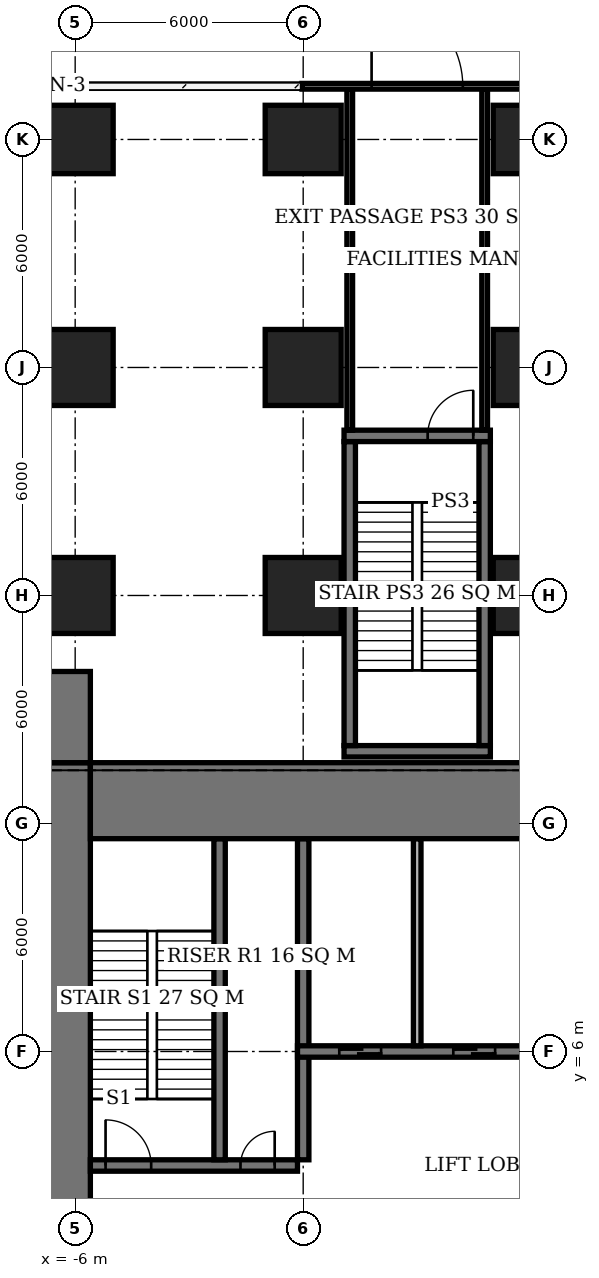
"""IFC4 building model, lengths in metres.
Left out: names, types, materials, properties, quantities, classifications, styles, units other than length and angle.
Written with IfcOpenShell. Run it as: python <this file> out.ifc"""

import sys

from ifc_helpers import new_model, si_unit, direction, frame, frame_2d, origin, origin_2d, place, context, subcontext, project, spatial, rectangle, extrude, element, fill, save


model = new_model("IFC4")
c1 = context("Model", 3, precision=1e-05, world=origin(), true_north=direction((0.0, 1.0)))
c2 = subcontext(c1, "Body", "Model", "MODEL_VIEW")
j1 = project(units=[si_unit("LENGTHUNIT", "METRE"), si_unit("PLANEANGLEUNIT", "RADIAN")], contexts=[c1])
p1 = place(None, origin())
s1 = spatial("IfcSite", under=j1, at=p1, CompositionType="ELEMENT")
p2 = place(p1, origin())
s2 = spatial("IfcBuilding", under=s1, at=p2, CompositionType="ELEMENT")
p3 = place(p2, origin())
s3 = spatial("IfcBuildingStorey", under=s2, at=p3, CompositionType="ELEMENT", Elevation=0.0)
p4 = place(p3, frame((-6.0, 18.0, 0.0), z_axis=(0.0, 0.0, 1.0), x_axis=(1.0, 0.0, 0.0)))
e1 = element("IfcColumn", 1, at=p4, inside=s3, PredefinedType="COLUMN", context=c2, shape_type="SweptSolid", body=[
    extrude(rectangle(XDim=2.0, YDim=2.0, at=origin_2d()), origin(), (0.0, 0.0, 1.0), 6.0),
])
p5 = place(p3, frame((-6.0, 24.0, -0.45), z_axis=(0.0, 0.0, 1.0), x_axis=(1.0, 0.0, 0.0)))
e2 = element("IfcColumn", 2, at=p5, inside=s3, PredefinedType="COLUMN", context=c2, shape_type="SweptSolid", body=[
    extrude(rectangle(XDim=2.0, YDim=2.0, at=origin_2d()), origin(), (0.0, 0.0, 1.0), 6.45),
])
p6 = place(p3, frame((-6.0, 30.0, -0.45), z_axis=(0.0, 0.0, 1.0), x_axis=(1.0, 0.0, 0.0)))
e3 = element("IfcColumn", 3, at=p6, inside=s3, PredefinedType="COLUMN", context=c2, shape_type="SweptSolid", body=[
    extrude(rectangle(XDim=2.0, YDim=1.8, at=origin_2d()), origin(), (0.0, 0.0, 1.0), 6.45),
])
p7 = place(p3, frame((0.0, 18.0, 0.0), z_axis=(0.0, 0.0, 1.0), x_axis=(1.0, 0.0, 0.0)))
e4 = element("IfcColumn", 4, at=p7, inside=s3, PredefinedType="COLUMN", context=c2, shape_type="SweptSolid", body=[
    extrude(rectangle(XDim=2.0, YDim=2.0, at=origin_2d()), origin(), (0.0, 0.0, 1.0), 6.0),
])
p8 = place(p3, frame((0.0, 24.0, -0.45), z_axis=(0.0, 0.0, 1.0), x_axis=(1.0, 0.0, 0.0)))
e5 = element("IfcColumn", 5, at=p8, inside=s3, PredefinedType="COLUMN", context=c2, shape_type="SweptSolid", body=[
    extrude(rectangle(XDim=2.0, YDim=2.0, at=origin_2d()), origin(), (0.0, 0.0, 1.0), 6.45),
])
p9 = place(p3, frame((0.0, 30.0, -0.45), z_axis=(0.0, 0.0, 1.0), x_axis=(1.0, 0.0, 0.0)))
e6 = element("IfcColumn", 6, at=p9, inside=s3, PredefinedType="COLUMN", context=c2, shape_type="SweptSolid", body=[
    extrude(rectangle(XDim=2.0, YDim=1.8, at=origin_2d()), origin(), (0.0, 0.0, 1.0), 6.45),
])
p10 = place(p3, frame((6.0, 18.0, 0.0), z_axis=(0.0, 0.0, 1.0), x_axis=(1.0, 0.0, 0.0)))
e7 = element("IfcColumn", 7, at=p10, inside=s3, PredefinedType="COLUMN", context=c2, shape_type="SweptSolid", body=[
    extrude(rectangle(XDim=2.0, YDim=2.0, at=origin_2d()), origin(), (0.0, 0.0, 1.0), 6.0),
])
p11 = place(p3, frame((6.0, 24.0, -0.45), z_axis=(0.0, 0.0, 1.0), x_axis=(1.0, 0.0, 0.0)))
e8 = element("IfcColumn", 8, at=p11, inside=s3, PredefinedType="COLUMN", context=c2, shape_type="SweptSolid", body=[
    extrude(rectangle(XDim=2.0, YDim=2.0, at=origin_2d()), origin(), (0.0, 0.0, 1.0), 6.45),
])
p12 = place(p3, frame((6.0, 30.0, -0.45), z_axis=(0.0, 0.0, 1.0), x_axis=(1.0, 0.0, 0.0)))
e9 = element("IfcColumn", 9, at=p12, inside=s3, PredefinedType="COLUMN", context=c2, shape_type="SweptSolid", body=[
    extrude(rectangle(XDim=2.0, YDim=1.8, at=origin_2d()), origin(), (0.0, 0.0, 1.0), 6.45),
])
p13 = place(p3, frame((-5.6, 12.6, 0.0), z_axis=(0.0, 0.0, 1.0), x_axis=(1.0, 0.0, 0.0)))
e10 = element("IfcWall", 10, at=p13, inside=s3, PredefinedType="SHEAR", context=c2, shape_type="SweptSolid", body=[
    extrude(rectangle(XDim=23.2, YDim=2.0, at=frame_2d((11.6, 0.0))), origin(), (0.0, 0.0, 1.0), 6.0),
])
p14 = place(p3, frame((-6.5, -7.6, 0.0), z_axis=(0.0, 0.0, 1.0), x_axis=(0.0, 1.0, 0.0)))
e11 = element("IfcWall", 11, at=p14, inside=s3, PredefinedType="SHEAR", context=c2, shape_type="SweptSolid", body=[
    extrude(rectangle(XDim=21.2, YDim=1.8, at=frame_2d((10.6, 0.0))), origin(), (0.0, 0.0, 1.0), 6.0),
])
p15 = place(p14, frame((7.8, 0.0, 0.0)))
e12 = element("IfcOpeningElement", 12, at=p15, cuts=e11, PredefinedType="OPENING", context=c2, shape_type="SweptSolid", body=[
    extrude(rectangle(XDim=1.8, YDim=2.4, at=frame_2d((0.9, 1.2))), frame((0.0, 0.91, 0.0), z_axis=(0.0, -1.0, 0.0), x_axis=(1.0, 0.0, 0.0)), (0.0, 0.0, 1.0), 1.82),
])
p16 = place(p3, frame((-6.5, 13.6, 0.0), z_axis=(0.0, 0.0, 1.0), x_axis=(0.0, 1.0, 0.0)))
e13 = element("IfcWall", 13, at=p16, inside=s3, PredefinedType="SHEAR", context=c2, shape_type="SweptSolid", body=[
    extrude(rectangle(XDim=2.4, YDim=1.8, at=frame_2d((1.2, 0.0))), origin(), (0.0, 0.0, 1.0), 6.0),
])
p17 = place(p3, frame((-5.6, 3.0, 0.0), z_axis=(0.0, 0.0, 1.0), x_axis=(1.0, 0.0, 0.0)))
e14 = element("IfcWall", 14, at=p17, inside=s3, PredefinedType="SHEAR", context=c2, shape_type="SweptSolid", body=[
    extrude(rectangle(XDim=5.45, YDim=0.3, at=frame_2d((2.725, 0.0))), origin(), (0.0, 0.0, 1.0), 6.0),
])
p18 = place(p17, frame((0.4, 0.0, 0.0)))
e15 = element("IfcOpeningElement", 15, at=p18, cuts=e14, PredefinedType="OPENING", context=c2, shape_type="SweptSolid", body=[
    extrude(rectangle(XDim=1.2, YDim=2.1, at=frame_2d((0.6, 1.05))), frame((0.0, 0.16, 0.0), z_axis=(0.0, -1.0, 0.0), x_axis=(1.0, 0.0, 0.0)), (0.0, 0.0, 1.0), 0.32),
])
p19 = place(p17, frame((3.95, 0.0, 0.0)))
e16 = element("IfcOpeningElement", 16, at=p19, cuts=e14, PredefinedType="OPENING", context=c2, shape_type="SweptSolid", body=[
    extrude(rectangle(XDim=0.9, YDim=2.1, at=frame_2d((0.45, 1.05))), frame((0.0, 0.16, 0.0), z_axis=(0.0, -1.0, 0.0), x_axis=(1.0, 0.0, 0.0)), (0.0, 0.0, 1.0), 0.32),
])
p20 = place(p3, frame((-0.15, 6.0, 0.0), z_axis=(0.0, 0.0, 1.0), x_axis=(1.0, 0.0, 0.0)))
e17 = element("IfcWall", 17, at=p20, inside=s3, PredefinedType="SHEAR", context=c2, shape_type="SweptSolid", body=[
    extrude(rectangle(XDim=17.75, YDim=0.3, at=frame_2d((8.875, 0.0))), origin(), (0.0, 0.0, 1.0), 6.0),
])
p21 = place(p20, frame((13.15, 0.0, 0.0)))
e18 = element("IfcOpeningElement", 18, at=p21, cuts=e17, PredefinedType="OPENING", context=c2, shape_type="SweptSolid", body=[
    extrude(rectangle(XDim=0.9, YDim=2.1, at=frame_2d((0.45, 1.05))), frame((0.0, 0.16, 0.0), z_axis=(0.0, -1.0, 0.0), x_axis=(1.0, 0.0, 0.0)), (0.0, 0.0, 1.0), 0.32),
])
p22 = place(p20, frame((16.25, 0.0, 0.0)))
e19 = element("IfcOpeningElement", 19, at=p22, cuts=e17, PredefinedType="OPENING", context=c2, shape_type="SweptSolid", body=[
    extrude(rectangle(XDim=1.0, YDim=2.1, at=frame_2d((0.5, 1.05))), frame((0.0, 0.16, 0.0), z_axis=(0.0, -1.0, 0.0), x_axis=(1.0, 0.0, 0.0)), (0.0, 0.0, 1.0), 0.32),
])
p23 = place(p20, frame((1.1, 0.0, 0.0)))
e20 = element("IfcOpeningElement", 20, at=p23, cuts=e17, PredefinedType="OPENING", context=c2, shape_type="SweptSolid", body=[
    extrude(rectangle(XDim=1.1, YDim=2.1, at=frame_2d((0.55, 1.05))), frame((0.0, 0.16, 0.0), z_axis=(0.0, -1.0, 0.0), x_axis=(1.0, 0.0, 0.0)), (0.0, 0.0, 1.0), 0.32),
])
p24 = place(p20, frame((4.1, 0.0, 0.0)))
e21 = element("IfcOpeningElement", 21, at=p24, cuts=e17, PredefinedType="OPENING", context=c2, shape_type="SweptSolid", body=[
    extrude(rectangle(XDim=1.1, YDim=2.1, at=frame_2d((0.55, 1.05))), frame((0.0, 0.16, 0.0), z_axis=(0.0, -1.0, 0.0), x_axis=(1.0, 0.0, 0.0)), (0.0, 0.0, 1.0), 0.32),
])
p25 = place(p20, frame((7.1, 0.0, 0.0)))
e22 = element("IfcOpeningElement", 22, at=p25, cuts=e17, PredefinedType="OPENING", context=c2, shape_type="SweptSolid", body=[
    extrude(rectangle(XDim=1.1, YDim=2.1, at=frame_2d((0.55, 1.05))), frame((0.0, 0.16, 0.0), z_axis=(0.0, -1.0, 0.0), x_axis=(1.0, 0.0, 0.0)), (0.0, 0.0, 1.0), 0.32),
])
p26 = place(p20, frame((10.1, 0.0, 0.0)))
e23 = element("IfcOpeningElement", 23, at=p26, cuts=e17, PredefinedType="OPENING", context=c2, shape_type="SweptSolid", body=[
    extrude(rectangle(XDim=1.1, YDim=2.1, at=frame_2d((0.55, 1.05))), frame((0.0, 0.16, 0.0), z_axis=(0.0, -1.0, 0.0), x_axis=(1.0, 0.0, 0.0)), (0.0, 0.0, 1.0), 0.32),
])
for number, where, z_axis, x_axis in (
    (24, (0.0, 3.15, 0.0), (0.0, 0.0, 1.0), (0.0, 1.0, 0.0)),
    (25, (-2.2, 3.15, 0.0), (0.0, 0.0, 1.0), (0.0, 1.0, 0.0)),
):
    element("IfcWall", number, at=place(p3, frame(where, z_axis=z_axis, x_axis=x_axis)), inside=s3, PredefinedType="SHEAR", context=c2, shape_type="SweptSolid", body=[
        extrude(rectangle(XDim=8.45, YDim=0.3, at=frame_2d((4.225, 0.0))), origin(), (0.0, 0.0, 1.0), 6.0),
    ])
p27 = place(p3, frame((3.0, 6.15, 0.0), z_axis=(0.0, 0.0, 1.0), x_axis=(0.0, 1.0, 0.0)))
e26 = element("IfcWall", 26, at=p27, inside=s3, PredefinedType="SOLIDWALL", context=c2, shape_type="SweptSolid", body=[
    extrude(rectangle(XDim=5.45, YDim=0.2, at=frame_2d((2.725, 0.0))), origin(), (0.0, 0.0, 1.0), 6.0),
])
p28 = place(p3, frame((-0.032, 31.4, 0.0), z_axis=(0.0, 0.0, 1.0), x_axis=(1.0, 0.0, 0.0)))
e27 = element("IfcWall", 27, at=p28, inside=s3, PredefinedType="USERDEFINED", context=c2, shape_type="SweptSolid", body=[
    extrude(rectangle(XDim=6.064, YDim=0.15, at=frame_2d((3.032, 0.0))), origin(), (0.0, 0.0, 1.0), 6.0),
])
p29 = place(p28, frame((1.832, 0.0, 0.0)))
e28 = element("IfcOpeningElement", 28, at=p29, cuts=e27, PredefinedType="OPENING", context=c2, shape_type="SweptSolid", body=[
    extrude(rectangle(XDim=2.4, YDim=2.7, at=frame_2d((1.2, 1.35))), frame((0.0, 0.085, 0.0), z_axis=(0.0, -1.0, 0.0), x_axis=(1.0, 0.0, 0.0)), (0.0, 0.0, 1.0), 0.17),
])
p30 = place(p3, frame((1.075, 13.9, 0.0), z_axis=(0.0, 0.0, 1.0), x_axis=(1.0, 0.0, 0.0)))
e29 = element("IfcWall", 29, at=p30, inside=s3, PredefinedType="SOLIDWALL", context=c2, shape_type="SweptSolid", body=[
    extrude(rectangle(XDim=3.85, YDim=0.3, at=frame_2d((1.925, 0.0))), origin(), (0.0, 0.0, 1.0), 5.75),
])
p31 = place(p3, frame((1.075, 22.2, 0.0), z_axis=(0.0, 0.0, 1.0), x_axis=(1.0, 0.0, 0.0)))
e30 = element("IfcWall", 30, at=p31, inside=s3, PredefinedType="SOLIDWALL", context=c2, shape_type="SweptSolid", body=[
    extrude(rectangle(XDim=3.85, YDim=0.3, at=frame_2d((1.925, 0.0))), origin(), (0.0, 0.0, 1.0), 5.75),
])
p32 = place(p31, frame((2.2, 0.0, 0.0)))
e31 = element("IfcOpeningElement", 31, at=p32, cuts=e30, PredefinedType="OPENING", context=c2, shape_type="SweptSolid", body=[
    extrude(rectangle(XDim=1.2, YDim=2.1, at=frame_2d((0.6, 1.05))), frame((0.0, 0.16, 0.0), z_axis=(0.0, -1.0, 0.0), x_axis=(1.0, 0.0, 0.0)), (0.0, 0.0, 1.0), 0.32),
])
for number, where, z_axis, x_axis in (
    (32, (1.225, 14.05, 0.0), (0.0, 0.0, 1.0), (0.0, 1.0, 0.0)),
    (33, (4.775, 14.05, 0.0), (0.0, 0.0, 1.0), (0.0, 1.0, 0.0)),
):
    element("IfcWall", number, at=place(p3, frame(where, z_axis=z_axis, x_axis=x_axis)), inside=s3, PredefinedType="SOLIDWALL", context=c2, shape_type="SweptSolid", body=[
        extrude(rectangle(XDim=8.0, YDim=0.3, at=frame_2d((4.0, 0.0))), origin(), (0.0, 0.0, 1.0), 5.75),
    ])
for number, where, z_axis, x_axis in (
    (34, (1.225, 22.35, 0.0), (0.0, 0.0, 1.0), (0.0, 1.0, 0.0)),
    (35, (4.775, 22.35, 0.0), (0.0, 0.0, 1.0), (0.0, 1.0, 0.0)),
):
    element("IfcWall", number, at=place(p3, frame(where, z_axis=z_axis, x_axis=x_axis)), inside=s3, PredefinedType="PARTITIONING", context=c2, shape_type="SweptSolid", body=[
        extrude(rectangle(XDim=8.975, YDim=0.15, at=frame_2d((4.487, 0.0))), origin(), (0.0, 0.0, 1.0), 5.75),
    ])
p33 = place(p18, origin())
e36 = element("IfcDoor", 36, at=p33, inside=s3, OperationType="SINGLE_SWING_LEFT", PredefinedType="DOOR", context=c2, shape_type="SweptSolid", body=[
    extrude(rectangle(XDim=1.2, YDim=2.1, at=frame_2d((0.6, 1.05))), frame((0.0, 0.025, 0.0), z_axis=(0.0, -1.0, 0.0), x_axis=(1.0, 0.0, 0.0)), (0.0, 0.0, 1.0), 0.05),
])
fill(e15, e36)
p34 = place(p19, origin())
e37 = element("IfcDoor", 37, at=p34, inside=s3, OperationType="SINGLE_SWING_RIGHT", PredefinedType="DOOR", context=c2, shape_type="SweptSolid", body=[
    extrude(rectangle(XDim=0.9, YDim=2.1, at=frame_2d((0.45, 1.05))), frame((0.0, 0.025, 0.0), z_axis=(0.0, -1.0, 0.0), x_axis=(1.0, 0.0, 0.0)), (0.0, 0.0, 1.0), 0.05),
])
fill(e16, e37)
p35 = place(p23, origin())
e38 = element("IfcDoor", 38, at=p35, inside=s3, OperationType="DOUBLE_DOOR_SLIDING", PredefinedType="USERDEFINED", context=c2, shape_type="SweptSolid", body=[
    extrude(rectangle(XDim=1.1, YDim=2.1, at=frame_2d((0.55, 1.05))), frame((0.0, 0.025, 0.0), z_axis=(0.0, -1.0, 0.0), x_axis=(1.0, 0.0, 0.0)), (0.0, 0.0, 1.0), 0.05),
])
fill(e20, e38)
p36 = place(p24, origin())
e39 = element("IfcDoor", 39, at=p36, inside=s3, OperationType="DOUBLE_DOOR_SLIDING", PredefinedType="USERDEFINED", context=c2, shape_type="SweptSolid", body=[
    extrude(rectangle(XDim=1.1, YDim=2.1, at=frame_2d((0.55, 1.05))), frame((0.0, 0.025, 0.0), z_axis=(0.0, -1.0, 0.0), x_axis=(1.0, 0.0, 0.0)), (0.0, 0.0, 1.0), 0.05),
])
fill(e21, e39)
p37 = place(p32, origin())
e40 = element("IfcDoor", 40, at=p37, inside=s3, OperationType="SINGLE_SWING_RIGHT", PredefinedType="DOOR", context=c2, shape_type="SweptSolid", body=[
    extrude(rectangle(XDim=1.2, YDim=2.1, at=frame_2d((0.6, 1.05))), frame((0.0, 0.025, 0.0), z_axis=(0.0, -1.0, 0.0), x_axis=(1.0, 0.0, 0.0)), (0.0, 0.0, 1.0), 0.05),
])
fill(e31, e40)
p38 = place(p29, origin())
e41 = element("IfcDoor", 41, at=p38, inside=s3, OperationType="DOUBLE_DOOR_SINGLE_SWING", PredefinedType="DOOR", context=c2, shape_type="SweptSolid", body=[
    extrude(rectangle(XDim=2.4, YDim=2.7, at=frame_2d((1.2, 1.35))), frame((0.0, 0.025, 0.0), z_axis=(0.0, -1.0, 0.0), x_axis=(1.0, 0.0, 0.0)), (0.0, 0.0, 1.0), 0.05),
])
fill(e28, e41)
save(model, sys.argv[1])
